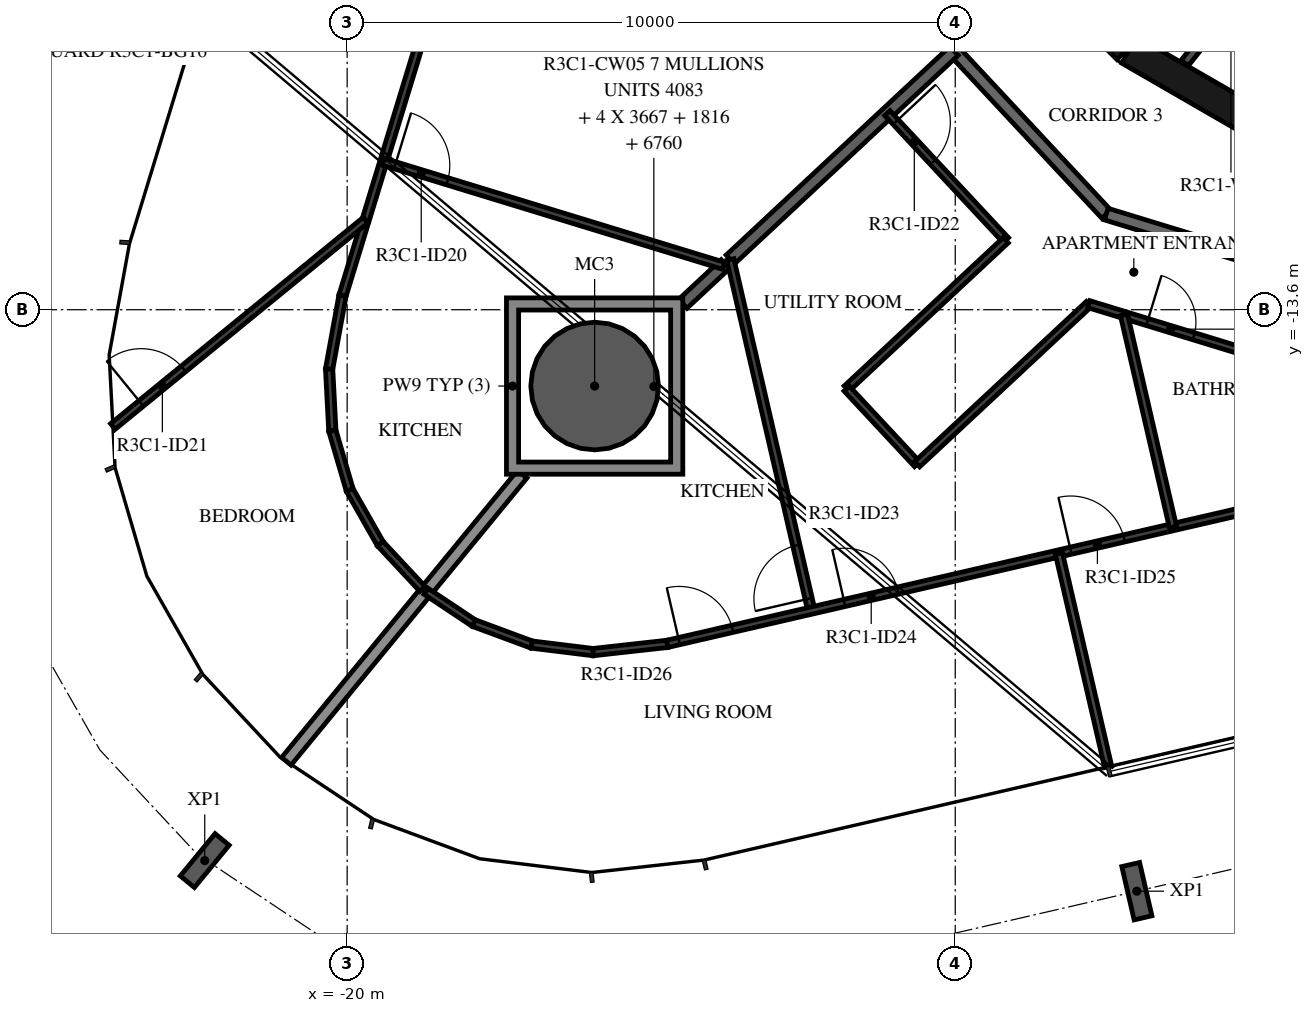
"""IFC4 building model, lengths in metres.
Left out: names, types, materials, properties, quantities, classifications, styles, units other than length and angle.
Written with IfcOpenShell. Run it as: python <this file> out.ifc"""

import sys

from ifc_helpers import new_model, si_unit, direction, frame, frame_2d, origin, origin_2d, place, context, subcontext, project, spatial, polyline, rectangle, hollow_circle, i_section, outline, extrude, element, fill, save


model = new_model("IFC4")
c1 = context("Model", 3, precision=1e-05, world=origin(), true_north=direction((0.0, 1.0)))
c2 = subcontext(c1, "Body", "Model", "MODEL_VIEW")
j1 = project(units=[si_unit("LENGTHUNIT", "METRE"), si_unit("PLANEANGLEUNIT", "RADIAN")], contexts=[c1])
p1 = place(None, origin())
s1 = spatial("IfcSite", under=j1, at=p1, CompositionType="ELEMENT")
p2 = place(p1, origin())
s2 = spatial("IfcBuilding", under=s1, at=p2, CompositionType="ELEMENT")
p3 = place(p2, frame((0.0, 0.0, 137.9)))
s3 = spatial("IfcBuildingStorey", under=s2, at=p3, CompositionType="ELEMENT", Elevation=137.9)
p4 = place(p3, frame((-15.93, -14.855, -0.38), z_axis=(0.0, 0.0, 1.0), x_axis=(1.0, 0.0, 0.0)))
e1 = element("IfcColumn", 1, at=p4, inside=s3, PredefinedType="COLUMN", context=c2, shape_type="SweptSolid", body=[
    extrude(hollow_circle(Radius=1.05, WallThickness=0.05, at=origin_2d()), origin(), (0.0, 0.0, 1.0), 3.5),
])
for number, where, z_axis, x_axis in (
    (2, (-22.342, -22.659, -0.38), (0.0, 0.0, 1.0), (-0.773, 0.635, 0.0)),
    (3, (-7.013, -23.162, -0.38), (0.0, 0.0, 1.0), (-0.974, -0.225, 0.0)),
):
    element("IfcColumn", number, at=place(p3, frame(where, z_axis=z_axis, x_axis=x_axis)), inside=s3, PredefinedType="COLUMN", context=c2, shape_type="SweptSolid", body=[
        extrude(i_section(OverallWidth=0.3, OverallDepth=0.9, WebThickness=0.019, FlangeThickness=0.035, FilletRadius=0.03, at=origin_2d()), origin(), (0.0, 0.0, 1.0), 3.5),
    ])
p5 = place(p3, frame((-9.308, -7.164, 0.0), z_axis=(0.0, 0.0, 1.0), x_axis=(0.707106781187, -0.707106781187, 0.0)))
e4 = element("IfcWall", 4, at=p5, inside=s3, PredefinedType="SHEAR", context=c2, shape_type="SweptSolid", body=[
    extrude(rectangle(XDim=3.032, YDim=0.5, at=frame_2d((1.516, 0.0))), origin(), (0.0, 0.0, 1.0), 3.12),
])
p6 = place(p3, frame((-7.137, -9.329, 0.0), z_axis=(0.0, 0.0, 1.0), x_axis=(0.865975092491, -0.500087131594, 0.0)))
e5 = element("IfcWall", 5, at=p6, inside=s3, PredefinedType="SHEAR", context=c2, shape_type="SweptSolid", body=[
    extrude(rectangle(XDim=3.033, YDim=0.5, at=frame_2d((1.516, 0.0))), origin(), (0.0, 0.0, 1.0), 3.12),
])
p7 = place(p3, frame((-4.706, -7.625, 0.0), z_axis=(0.0, 0.0, 1.0), x_axis=(-0.621392599334, -0.783499353856, 0.0)))
e6 = element("IfcWall", 6, at=p7, inside=s3, PredefinedType="PARTITIONING", context=c2, shape_type="SweptSolid", body=[
    extrude(rectangle(XDim=2.447, YDim=0.15, at=frame_2d((1.224, 0.0))), origin(), (0.0, 0.0, 1.0), 3.12),
])
p8 = place(p7, frame((0.774, 0.0, 0.0)))
e7 = element("IfcOpeningElement", 7, at=p8, cuts=e6, PredefinedType="OPENING", context=c2, shape_type="SweptSolid", body=[
    extrude(rectangle(XDim=0.9, YDim=2.1, at=frame_2d((0.45, 1.05))), frame((0.0, 0.085, 0.0), z_axis=(0.0, -1.0, 0.0), x_axis=(1.0, 0.0, 0.0)), (0.0, 0.0, 1.0), 0.17),
])
p9 = place(p3, frame((-12.523, -6.659, 0.0), z_axis=(0.0, 0.0, 1.0), x_axis=(0.682001841105, -0.731350455479, 0.0)))
e8 = element("IfcWall", 8, at=p9, inside=s3, PredefinedType="STANDARD", context=c2, shape_type="SweptSolid", body=[
    extrude(rectangle(XDim=7.342, YDim=0.2, at=frame_2d((3.671, 0.0))), origin(), (0.0, 0.0, 1.0), 3.12),
])
p10 = place(p3, frame((-7.516, -12.028, 0.0), z_axis=(0.0, 0.0, 1.0), x_axis=(0.956306642771, -0.292365533182, 0.0)))
e9 = element("IfcWall", 9, at=p10, inside=s3, PredefinedType="STANDARD", context=c2, shape_type="SweptSolid", body=[
    extrude(rectangle(XDim=7.342, YDim=0.2, at=frame_2d((3.671, 0.0))), origin(), (0.0, 0.0, 1.0), 3.12),
])
p11 = place(p10, frame((5.745, 0.0, 0.0)))
e10 = element("IfcOpeningElement", 10, at=p11, cuts=e9, PredefinedType="OPENING", context=c2, shape_type="SweptSolid", body=[
    extrude(rectangle(XDim=1.0, YDim=2.1, at=frame_2d((0.5, 1.05))), frame((0.0, 0.11, 0.0), z_axis=(0.0, -1.0, 0.0), x_axis=(1.0, 0.0, 0.0)), (0.0, 0.0, 1.0), 0.22),
])
p12 = place(p3, frame((-13.699, -12.774, 0.0), z_axis=(0.0, 0.0, 1.0), x_axis=(0.731353758457, 0.681998299111, 0.0)))
e11 = element("IfcWall", 11, at=p12, inside=s3, PredefinedType="STANDARD", context=c2, shape_type="SweptSolid", body=[
    extrude(rectangle(XDim=5.031, YDim=0.2, at=frame_2d((2.515, 0.0))), origin(), (0.0, 0.0, 1.0), 3.12),
])
p13 = place(p3, frame((-21.0, -21.025, 0.0), z_axis=(0.0, 0.0, 1.0), x_axis=(0.634846795952, 0.772638043116, 0.0)))
e12 = element("IfcWall", 12, at=p13, inside=s3, PredefinedType="STANDARD", context=c2, shape_type="SweptSolid", body=[
    extrude(rectangle(XDim=6.109, YDim=0.2, at=frame_2d((3.055, 0.0))), origin(), (0.0, 0.0, 1.0), 2.73),
])
p14 = place(p3, frame((-14.48, -13.503, 0.0), z_axis=(0.0, 0.0, 1.0), x_axis=(0.73152991834, 0.681809341806, 0.0)))
e13 = element("IfcWall", 13, at=p14, inside=s3, PredefinedType="STANDARD", context=c2, shape_type="SweptSolid", body=[
    extrude(rectangle(XDim=0.958, YDim=0.2, at=frame_2d((0.479, 0.0))), origin(), (0.0, 0.0, 1.0), 3.12),
])
p15 = place(p3, frame((-16.579, -1.928, 0.0), z_axis=(0.0, 0.0, 1.0), x_axis=(-0.29236733738, -0.956306091183, 0.0)))
e14 = element("IfcWall", 14, at=p15, inside=s3, PredefinedType="PARTITIONING", context=c2, shape_type="SweptSolid", body=[
    extrude(rectangle(XDim=11.963, YDim=0.12, at=frame_2d((5.981, 0.0))), origin(), (0.0, 0.0, 1.0), 3.12),
])
p16 = place(p15, frame((3.271, 0.0, 0.0)))
e15 = element("IfcOpeningElement", 15, at=p16, cuts=e14, PredefinedType="OPENING", context=c2, shape_type="SweptSolid", body=[
    extrude(rectangle(XDim=0.9, YDim=2.1, at=frame_2d((0.45, 1.05))), frame((0.0, 0.07, 0.0), z_axis=(0.0, -1.0, 0.0), x_axis=(1.0, 0.0, 0.0)), (0.0, 0.0, 1.0), 0.14),
])
p17 = place(p3, frame((-19.404, -11.167, 0.0), z_axis=(0.0, 0.0, 1.0), x_axis=(0.956314306829, -0.292340463423, 0.0)))
e16 = element("IfcWall", 16, at=p17, inside=s3, PredefinedType="PARTITIONING", context=c2, shape_type="SweptSolid", body=[
    extrude(rectangle(XDim=5.85, YDim=0.12, at=frame_2d((2.925, 0.0))), origin(), (0.0, 0.0, 1.0), 3.12),
])
p18 = place(p17, frame((0.2, 0.0, 0.0)))
e17 = element("IfcOpeningElement", 17, at=p18, cuts=e16, PredefinedType="OPENING", context=c2, shape_type="SweptSolid", body=[
    extrude(rectangle(XDim=0.9, YDim=2.1, at=frame_2d((0.45, 1.05))), frame((0.0, 0.07, 0.0), z_axis=(0.0, -1.0, 0.0), x_axis=(1.0, 0.0, 0.0)), (0.0, 0.0, 1.0), 0.14),
])
p19 = place(p3, frame((-23.852, -15.52, 0.0), z_axis=(0.0, 0.0, 1.0), x_axis=(0.774546990858, 0.632516370502, 0.0)))
e18 = element("IfcWall", 18, at=p19, inside=s3, PredefinedType="PARTITIONING", context=c2, shape_type="SweptSolid", body=[
    extrude(rectangle(XDim=5.365, YDim=0.12, at=frame_2d((2.682, 0.0))), origin(), (0.0, 0.0, 1.0), 3.12),
])
p20 = place(p19, frame((0.6, 0.0, 0.0)))
e19 = element("IfcOpeningElement", 19, at=p20, cuts=e18, PredefinedType="OPENING", context=c2, shape_type="SweptSolid", body=[
    extrude(rectangle(XDim=0.9, YDim=2.1, at=frame_2d((0.45, 1.05))), frame((0.0, 0.07, 0.0), z_axis=(0.0, -1.0, 0.0), x_axis=(1.0, 0.0, 0.0)), (0.0, 0.0, 1.0), 0.14),
])
p21 = place(p3, frame((-20.077, -13.368, 0.0), z_axis=(0.0, 0.0, 1.0), x_axis=(-0.179288174895, -0.983796600087, 0.0)))
e20 = element("IfcWall", 20, at=p21, inside=s3, PredefinedType="PARTITIONING", context=c2, shape_type="SweptSolid", body=[
    extrude(rectangle(XDim=1.227, YDim=0.12, at=frame_2d((0.613, 0.0))), origin(), (0.0, 0.0, 1.0), 3.12),
])
p22 = place(p3, frame((-20.297, -14.575, 0.0), z_axis=(0.0, 0.0, 1.0), x_axis=(0.052142637988, -0.998639647372, 0.0)))
e21 = element("IfcWall", 21, at=p22, inside=s3, PredefinedType="PARTITIONING", context=c2, shape_type="SweptSolid", body=[
    extrude(rectangle(XDim=1.016, YDim=0.12, at=frame_2d((0.508, 0.0))), origin(), (0.0, 0.0, 1.0), 3.12),
])
for number, where, z_axis, x_axis in (
    (22, (-20.244, -15.59, 0.0), (0.0, 0.0, 1.0), (0.281, -0.96, 0.0)),
    (23, (-19.958, -16.565, 0.0), (0.0, 0.0, 1.0), (0.495, -0.869, 0.0)),
    (24, (-19.455, -17.448, 0.0), (0.0, 0.0, 1.0), (0.682, -0.731, 0.0)),
):
    element("IfcWall", number, at=place(p3, frame(where, z_axis=z_axis, x_axis=x_axis)), inside=s3, PredefinedType="PARTITIONING", context=c2, shape_type="SweptSolid", body=[
        extrude(rectangle(XDim=1.016, YDim=0.12, at=frame_2d((0.508, 0.0))), origin(), (0.0, 0.0, 1.0), 3.12),
    ])
p23 = place(p3, frame((-11.117, -10.366, 0.0), z_axis=(0.0, 0.0, 1.0), x_axis=(0.682029016154, -0.73132511315, 0.0)))
e25 = element("IfcWall", 25, at=p23, inside=s3, PredefinedType="PARTITIONING", context=c2, shape_type="SweptSolid", body=[
    extrude(rectangle(XDim=2.858, YDim=0.12, at=frame_2d((1.429, 0.0))), origin(), (0.0, 0.0, 1.0), 3.12),
])
p24 = place(p23, frame((0.2, 0.0, 0.0)))
e26 = element("IfcOpeningElement", 26, at=p24, cuts=e25, PredefinedType="OPENING", context=c2, shape_type="SweptSolid", body=[
    extrude(rectangle(XDim=0.9, YDim=2.1, at=frame_2d((0.45, 1.05))), frame((0.0, 0.07, 0.0), z_axis=(0.0, -1.0, 0.0), x_axis=(1.0, 0.0, 0.0)), (0.0, 0.0, 1.0), 0.14),
])
p25 = place(p3, frame((-9.168, -12.456, 0.0), z_axis=(0.0, 0.0, 1.0), x_axis=(-0.731372816465, -0.681977861324, 0.0)))
e27 = element("IfcWall", 27, at=p25, inside=s3, PredefinedType="PARTITIONING", context=c2, shape_type="SweptSolid", body=[
    extrude(rectangle(XDim=3.578, YDim=0.12, at=frame_2d((1.789, 0.0))), origin(), (0.0, 0.0, 1.0), 3.12),
])
p26 = place(p3, frame((-11.785, -14.897, 0.0), z_axis=(0.0, 0.0, 1.0), x_axis=(0.681975367709, -0.73137514166, 0.0)))
e28 = element("IfcWall", 28, at=p26, inside=s3, PredefinedType="PARTITIONING", context=c2, shape_type="SweptSolid", body=[
    extrude(rectangle(XDim=1.7, YDim=0.12, at=frame_2d((0.85, 0.0))), origin(), (0.0, 0.0, 1.0), 3.12),
])
p27 = place(p3, frame((-10.625, -16.14, 0.0), z_axis=(0.0, 0.0, 1.0), x_axis=(0.73135399721, 0.68199804308, 0.0)))
e29 = element("IfcWall", 29, at=p27, inside=s3, PredefinedType="PARTITIONING", context=c2, shape_type="SweptSolid", body=[
    extrude(rectangle(XDim=3.858, YDim=0.12, at=frame_2d((1.929, 0.0))), origin(), (0.0, 0.0, 1.0), 3.12),
])
p28 = place(p3, frame((-7.804, -13.509, 0.0), z_axis=(0.0, 0.0, 1.0), x_axis=(0.956309088343, -0.292357533772, 0.0)))
e30 = element("IfcWall", 30, at=p28, inside=s3, PredefinedType="PARTITIONING", context=c2, shape_type="SweptSolid", body=[
    extrude(rectangle(XDim=7.586, YDim=0.12, at=frame_2d((3.793, 0.0))), origin(), (0.0, 0.0, 1.0), 3.12),
])
p29 = place(p28, frame((1.006, 0.0, 0.0)))
e31 = element("IfcOpeningElement", 31, at=p29, cuts=e30, PredefinedType="OPENING", context=c2, shape_type="SweptSolid", body=[
    extrude(rectangle(XDim=0.8, YDim=2.1, at=frame_2d((0.4, 1.05))), frame((0.0, 0.07, 0.0), z_axis=(0.0, -1.0, 0.0), x_axis=(1.0, 0.0, 0.0)), (0.0, 0.0, 1.0), 0.14),
])
p30 = place(p3, frame((-12.366, -18.548, 0.0), z_axis=(0.0, 0.0, 1.0), x_axis=(-0.224958805164, 0.974368275335, 0.0)))
e32 = element("IfcWall", 32, at=p30, inside=s3, PredefinedType="PARTITIONING", context=c2, shape_type="SweptSolid", body=[
    extrude(rectangle(XDim=5.926, YDim=0.12, at=frame_2d((2.963, 0.0))), origin(), (0.0, 0.0, 1.0), 3.12),
])
p31 = place(p30, frame((0.2, 0.0, 0.0)))
e33 = element("IfcOpeningElement", 33, at=p31, cuts=e32, PredefinedType="OPENING", context=c2, shape_type="SweptSolid", body=[
    extrude(rectangle(XDim=0.9, YDim=2.1, at=frame_2d((0.45, 1.05))), frame((0.0, 0.07, 0.0), z_axis=(0.0, -1.0, 0.0), x_axis=(1.0, 0.0, 0.0)), (0.0, 0.0, 1.0), 0.14),
])
p32 = place(p3, frame((-18.703, -18.23, 0.0), z_axis=(0.0, 0.0, 1.0), x_axis=(0.832328473933, -0.554282699965, 0.0)))
e34 = element("IfcWall", 34, at=p32, inside=s3, PredefinedType="PARTITIONING", context=c2, shape_type="SweptSolid", body=[
    extrude(rectangle(XDim=0.945, YDim=0.12, at=frame_2d((0.472, 0.0))), origin(), (0.0, 0.0, 1.0), 3.12),
])
p33 = place(p3, frame((-17.917, -18.754, 0.0), z_axis=(0.0, 0.0, 1.0), x_axis=(0.937684971769, -0.347486537462, 0.0)))
e35 = element("IfcWall", 35, at=p33, inside=s3, PredefinedType="PARTITIONING", context=c2, shape_type="SweptSolid", body=[
    extrude(rectangle(XDim=1.016, YDim=0.12, at=frame_2d((0.508, 0.0))), origin(), (0.0, 0.0, 1.0), 3.12),
])
p34 = place(p3, frame((-16.964, -19.107, 0.0), z_axis=(0.0, 0.0, 1.0), x_axis=(0.992523553766, -0.122053247474, 0.0)))
e36 = element("IfcWall", 36, at=p34, inside=s3, PredefinedType="PARTITIONING", context=c2, shape_type="SweptSolid", body=[
    extrude(rectangle(XDim=1.016, YDim=0.12, at=frame_2d((0.508, 0.0))), origin(), (0.0, 0.0, 1.0), 3.12),
])
p35 = place(p3, frame((-15.956, -19.231, 0.0), z_axis=(0.0, 0.0, 1.0), x_axis=(0.993883734674, 0.110431526075, 0.0)))
e37 = element("IfcWall", 37, at=p35, inside=s3, PredefinedType="PARTITIONING", context=c2, shape_type="SweptSolid", body=[
    extrude(rectangle(XDim=1.227, YDim=0.12, at=frame_2d((0.614, 0.0))), origin(), (0.0, 0.0, 1.0), 3.12),
])
p36 = place(p3, frame((-14.736, -19.095, 0.0), z_axis=(0.0, 0.0, 1.0), x_axis=(0.974368335243, 0.224958545682, 0.0)))
e38 = element("IfcWall", 38, at=p36, inside=s3, PredefinedType="PARTITIONING", context=c2, shape_type="SweptSolid", body=[
    extrude(rectangle(XDim=19.263, YDim=0.12, at=frame_2d((9.632, 0.0))), origin(), (0.0, 0.0, 1.0), 3.12),
])
p37 = place(p36, frame((2.993, 0.0, 0.0)))
e39 = element("IfcOpeningElement", 39, at=p37, cuts=e38, PredefinedType="OPENING", context=c2, shape_type="SweptSolid", body=[
    extrude(rectangle(XDim=0.9, YDim=2.1, at=frame_2d((0.45, 1.05))), frame((0.0, 0.07, 0.0), z_axis=(0.0, -1.0, 0.0), x_axis=(1.0, 0.0, 0.0)), (0.0, 0.0, 1.0), 0.14),
])
p38 = place(p36, frame((6.81, 0.0, 0.0)))
e40 = element("IfcOpeningElement", 40, at=p38, cuts=e38, PredefinedType="OPENING", context=c2, shape_type="SweptSolid", body=[
    extrude(rectangle(XDim=0.9, YDim=2.1, at=frame_2d((0.45, 1.05))), frame((0.0, 0.07, 0.0), z_axis=(0.0, -1.0, 0.0), x_axis=(1.0, 0.0, 0.0)), (0.0, 0.0, 1.0), 0.14),
])
p39 = place(p36, frame((0.2, 0.0, 0.0)))
e41 = element("IfcOpeningElement", 41, at=p39, cuts=e38, PredefinedType="OPENING", context=c2, shape_type="SweptSolid", body=[
    extrude(rectangle(XDim=0.9, YDim=2.1, at=frame_2d((0.45, 1.05))), frame((0.0, 0.07, 0.0), z_axis=(0.0, -1.0, 0.0), x_axis=(1.0, 0.0, 0.0)), (0.0, 0.0, 1.0), 0.14),
])
p40 = place(p36, frame((14.839, 0.0, 0.0)))
e42 = element("IfcOpeningElement", 42, at=p40, cuts=e38, PredefinedType="OPENING", context=c2, shape_type="SweptSolid", body=[
    extrude(rectangle(XDim=0.9, YDim=2.1, at=frame_2d((0.45, 1.05))), frame((0.0, 0.07, 0.0), z_axis=(0.0, -1.0, 0.0), x_axis=(1.0, 0.0, 0.0)), (0.0, 0.0, 1.0), 0.14),
])
p41 = place(p3, frame((-6.419, -17.175, 0.0), z_axis=(0.0, 0.0, 1.0), x_axis=(-0.224979003559, 0.974363611778, 0.0)))
e43 = element("IfcWall", 43, at=p41, inside=s3, PredefinedType="PARTITIONING", context=c2, shape_type="SweptSolid", body=[
    extrude(rectangle(XDim=3.581, YDim=0.12, at=frame_2d((1.791, 0.0))), origin(), (0.0, 0.0, 1.0), 3.12),
])
p42 = place(p3, frame((-7.486, -21.116, 0.0), z_axis=(0.0, 0.0, 1.0), x_axis=(-0.224943703639, 0.9743717618, 0.0)))
e44 = element("IfcWall", 44, at=p42, inside=s3, PredefinedType="PARTITIONING", context=c2, shape_type="SweptSolid", body=[
    extrude(rectangle(XDim=3.6, YDim=0.12, at=frame_2d((1.8, 0.0))), origin(), (0.0, 0.0, 1.0), 2.73),
])
p43 = place(p3, origin())
e45 = element("IfcWall", 45, at=p43, inside=s3, PredefinedType="STANDARD", context=c2, shape_type="SweptSolid", body=[
    extrude(outline(polyline([(-14.48, -13.405), (-14.48, -16.305), (-17.38, -16.305), (-17.38, -13.405), (-14.48, -13.405)]), holes=[polyline([(-17.18, -16.105), (-14.68, -16.105), (-14.68, -13.605), (-17.18, -13.605), (-17.18, -16.105)])]), origin(), (0.0, 0.0, 1.0), 3.12),
])
p44 = place(p18, origin())
e46 = element("IfcDoor", 46, at=p44, inside=s3, OperationType="SINGLE_SWING_RIGHT", PredefinedType="DOOR", context=c2, shape_type="SweptSolid", body=[
    extrude(rectangle(XDim=0.9, YDim=2.1, at=frame_2d((0.45, 1.05))), frame((0.0, 0.025, 0.0), z_axis=(0.0, -1.0, 0.0), x_axis=(1.0, 0.0, 0.0)), (0.0, 0.0, 1.0), 0.05),
])
fill(e17, e46)
p45 = place(p20, origin())
e47 = element("IfcDoor", 47, at=p45, inside=s3, OperationType="SINGLE_SWING_RIGHT", PredefinedType="DOOR", context=c2, shape_type="SweptSolid", body=[
    extrude(rectangle(XDim=0.9, YDim=2.1, at=frame_2d((0.45, 1.05))), frame((0.0, 0.025, 0.0), z_axis=(0.0, -1.0, 0.0), x_axis=(1.0, 0.0, 0.0)), (0.0, 0.0, 1.0), 0.05),
])
fill(e19, e47)
p46 = place(p24, origin())
e48 = element("IfcDoor", 48, at=p46, inside=s3, OperationType="SINGLE_SWING_LEFT", PredefinedType="DOOR", context=c2, shape_type="SweptSolid", body=[
    extrude(rectangle(XDim=0.9, YDim=2.1, at=frame_2d((0.45, 1.05))), frame((0.0, 0.025, 0.0), z_axis=(0.0, -1.0, 0.0), x_axis=(1.0, 0.0, 0.0)), (0.0, 0.0, 1.0), 0.05),
])
fill(e26, e48)
p47 = place(p29, origin())
e49 = element("IfcDoor", 49, at=p47, inside=s3, OperationType="SINGLE_SWING_LEFT", PredefinedType="DOOR", context=c2, shape_type="SweptSolid", body=[
    extrude(rectangle(XDim=0.8, YDim=2.1, at=frame_2d((0.4, 1.05))), frame((0.0, 0.025, 0.0), z_axis=(0.0, -1.0, 0.0), x_axis=(1.0, 0.0, 0.0)), (0.0, 0.0, 1.0), 0.05),
])
fill(e31, e49)
p48 = place(p31, origin())
e50 = element("IfcDoor", 50, at=p48, inside=s3, OperationType="SINGLE_SWING_LEFT", PredefinedType="DOOR", context=c2, shape_type="SweptSolid", body=[
    extrude(rectangle(XDim=0.9, YDim=2.1, at=frame_2d((0.45, 1.05))), frame((0.0, 0.025, 0.0), z_axis=(0.0, -1.0, 0.0), x_axis=(1.0, 0.0, 0.0)), (0.0, 0.0, 1.0), 0.05),
])
fill(e33, e50)
p49 = place(p37, origin())
e51 = element("IfcDoor", 51, at=p49, inside=s3, OperationType="SINGLE_SWING_LEFT", PredefinedType="DOOR", context=c2, shape_type="SweptSolid", body=[
    extrude(rectangle(XDim=0.9, YDim=2.1, at=frame_2d((0.45, 1.05))), frame((0.0, 0.025, 0.0), z_axis=(0.0, -1.0, 0.0), x_axis=(1.0, 0.0, 0.0)), (0.0, 0.0, 1.0), 0.05),
])
fill(e39, e51)
p50 = place(p38, origin())
e52 = element("IfcDoor", 52, at=p50, inside=s3, OperationType="SINGLE_SWING_LEFT", PredefinedType="DOOR", context=c2, shape_type="SweptSolid", body=[
    extrude(rectangle(XDim=0.9, YDim=2.1, at=frame_2d((0.45, 1.05))), frame((0.0, 0.025, 0.0), z_axis=(0.0, -1.0, 0.0), x_axis=(1.0, 0.0, 0.0)), (0.0, 0.0, 1.0), 0.05),
])
fill(e40, e52)
p51 = place(p39, origin())
e53 = element("IfcDoor", 53, at=p51, inside=s3, OperationType="SINGLE_SWING_LEFT", PredefinedType="DOOR", context=c2, shape_type="SweptSolid", body=[
    extrude(rectangle(XDim=0.9, YDim=2.1, at=frame_2d((0.45, 1.05))), frame((0.0, 0.025, 0.0), z_axis=(0.0, -1.0, 0.0), x_axis=(1.0, 0.0, 0.0)), (0.0, 0.0, 1.0), 0.05),
])
fill(e41, e53)
save(model, sys.argv[1])
